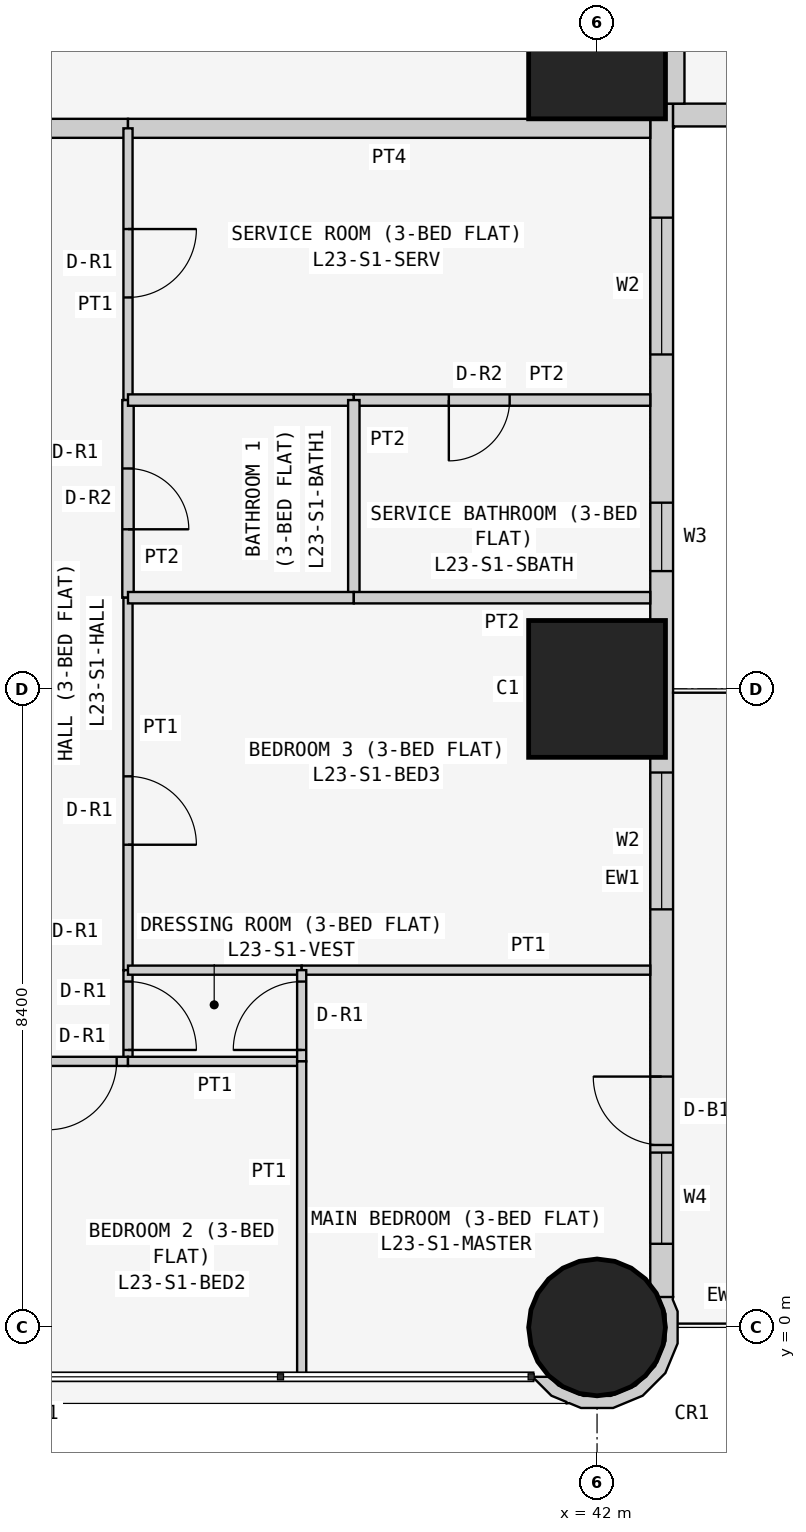
"""IFC4 building model, lengths in metres.
Left out: names, types, materials, properties, quantities, classifications, styles, units other than length and angle.
Written with IfcOpenShell. Run it as: python <this file> out.ifc"""

import sys

from ifc_helpers import new_model, si_unit, direction, frame, frame_2d, origin, origin_2d, place, context, subcontext, project, spatial, polyline, rectangle, circle, outline, extrude, element, fill, save


model = new_model("IFC4")
c1 = context("Model", 3, precision=1e-05, world=origin(), true_north=direction((0.0, 1.0)))
c2 = subcontext(c1, "Body", "Model", "MODEL_VIEW")
j1 = project(units=[si_unit("LENGTHUNIT", "METRE"), si_unit("PLANEANGLEUNIT", "RADIAN")], contexts=[c1])
p1 = place(None, origin())
s1 = spatial("IfcSite", under=j1, at=p1, CompositionType="ELEMENT")
p2 = place(p1, origin())
s2 = spatial("IfcBuilding", under=s1, at=p2, CompositionType="ELEMENT")
p3 = place(p2, frame((0.0, 0.0, 92.1)))
s3 = spatial("IfcBuildingStorey", under=s2, at=p3, CompositionType="ELEMENT", Elevation=92.1)
p4 = place(p3, frame((42.0, 0.0, 0.0), z_axis=(0.0, 0.0, 1.0), x_axis=(1.0, 0.0, 0.0)))
e1 = element("IfcColumn", 1, at=p4, inside=s3, PredefinedType="COLUMN", context=c2, shape_type="SweptSolid", body=[
    extrude(circle(Radius=0.9, at=origin_2d()), origin(), (0.0, 0.0, 1.0), 3.6),
])
for number, where, z_axis, x_axis in (
    (2, (42.0, 8.4, 0.0), (0.0, 0.0, 1.0), (1.0, 0.0, 0.0)),
    (3, (42.0, 16.8, 0.0), (0.0, 0.0, 1.0), (1.0, 0.0, 0.0)),
):
    element("IfcColumn", number, at=place(p3, frame(where, z_axis=z_axis, x_axis=x_axis)), inside=s3, PredefinedType="COLUMN", context=c2, shape_type="SweptSolid", body=[
        extrude(rectangle(XDim=1.8, YDim=1.8, at=origin_2d()), origin(), (0.0, 0.0, 1.0), 3.6),
    ])
p5 = place(p3, frame((42.85, 0.4, 0.0), z_axis=(0.0, 0.0, 1.0), x_axis=(0.0, 1.0, 0.0)))
e4 = element("IfcWall", 4, at=p5, inside=s3, PredefinedType="SOLIDWALL", context=c2, shape_type="SweptSolid", body=[
    extrude(rectangle(XDim=15.7, YDim=0.3, at=frame_2d((7.85, 0.0))), origin(), (0.0, 0.0, 1.0), 3.45),
])
p6 = place(p5, frame((12.4, 0.0, 0.9)))
e5 = element("IfcOpeningElement", 5, at=p6, cuts=e4, PredefinedType="OPENING", context=c2, shape_type="SweptSolid", body=[
    extrude(rectangle(XDim=1.8, YDim=1.5, at=frame_2d((0.9, 0.75))), frame((0.0, 0.16, 0.0), z_axis=(0.0, -1.0, 0.0), x_axis=(1.0, 0.0, 0.0)), (0.0, 0.0, 1.0), 0.32),
])
p7 = place(p5, frame((9.55, 0.0, 1.5)))
e6 = element("IfcOpeningElement", 6, at=p7, cuts=e4, PredefinedType="OPENING", context=c2, shape_type="SweptSolid", body=[
    extrude(rectangle(XDim=0.9, YDim=0.7, at=frame_2d((0.45, 0.35))), frame((0.0, 0.16, 0.0), z_axis=(0.0, -1.0, 0.0), x_axis=(1.0, 0.0, 0.0)), (0.0, 0.0, 1.0), 0.32),
])
p8 = place(p5, frame((5.1, 0.0, 0.9)))
e7 = element("IfcOpeningElement", 7, at=p8, cuts=e4, PredefinedType="OPENING", context=c2, shape_type="SweptSolid", body=[
    extrude(rectangle(XDim=1.8, YDim=1.5, at=frame_2d((0.9, 0.75))), frame((0.0, 0.16, 0.0), z_axis=(0.0, -1.0, 0.0), x_axis=(1.0, 0.0, 0.0)), (0.0, 0.0, 1.0), 0.32),
])
p9 = place(p5, frame((2.0, 0.0, 0.0)))
e8 = element("IfcOpeningElement", 8, at=p9, cuts=e4, PredefinedType="OPENING", context=c2, shape_type="SweptSolid", body=[
    extrude(rectangle(XDim=0.9, YDim=2.4, at=frame_2d((0.45, 1.2))), frame((0.0, 0.16, 0.0), z_axis=(0.0, -1.0, 0.0), x_axis=(1.0, 0.0, 0.0)), (0.0, 0.0, 1.0), 0.32),
])
p10 = place(p5, frame((0.7, 0.0, 0.9)))
e9 = element("IfcOpeningElement", 9, at=p10, cuts=e4, PredefinedType="OPENING", context=c2, shape_type="SweptSolid", body=[
    extrude(rectangle(XDim=1.2, YDim=1.5, at=frame_2d((0.6, 0.75))), frame((0.0, 0.16, 0.0), z_axis=(0.0, -1.0, 0.0), x_axis=(1.0, 0.0, 0.0)), (0.0, 0.0, 1.0), 0.32),
])
p11 = place(p3, frame((43.0, 15.95, 0.0), z_axis=(0.0, 0.0, 1.0), x_axis=(1.0, 0.0, 0.0)))
e10 = element("IfcWall", 10, at=p11, inside=s3, PredefinedType="SOLIDWALL", context=c2, shape_type="SweptSolid", body=[
    extrude(rectangle(XDim=15.4, YDim=0.3, at=frame_2d((7.7, 0.0))), origin(), (0.0, 0.0, 1.0), 3.45),
])
p12 = place(p11, frame((1.2, 0.0, 0.9)))
e11 = element("IfcOpeningElement", 11, at=p12, cuts=e10, PredefinedType="OPENING", context=c2, shape_type="SweptSolid", body=[
    extrude(rectangle(XDim=1.8, YDim=1.5, at=frame_2d((0.9, 0.75))), frame((0.0, 0.16, 0.0), z_axis=(0.0, -1.0, 0.0), x_axis=(1.0, 0.0, 0.0)), (0.0, 0.0, 1.0), 0.32),
])
p13 = place(p11, frame((4.95, 0.0, 1.5)))
e12 = element("IfcOpeningElement", 12, at=p13, cuts=e10, PredefinedType="OPENING", context=c2, shape_type="SweptSolid", body=[
    extrude(rectangle(XDim=0.9, YDim=0.7, at=frame_2d((0.45, 0.35))), frame((0.0, 0.16, 0.0), z_axis=(0.0, -1.0, 0.0), x_axis=(1.0, 0.0, 0.0)), (0.0, 0.0, 1.0), 0.32),
])
p14 = place(p11, frame((8.5, 0.0, 0.9)))
e13 = element("IfcOpeningElement", 13, at=p14, cuts=e10, PredefinedType="OPENING", context=c2, shape_type="SweptSolid", body=[
    extrude(rectangle(XDim=1.8, YDim=1.5, at=frame_2d((0.9, 0.75))), frame((0.0, 0.16, 0.0), z_axis=(0.0, -1.0, 0.0), x_axis=(1.0, 0.0, 0.0)), (0.0, 0.0, 1.0), 0.32),
])
p15 = place(p11, frame((12.5, 0.0, 0.0)))
e14 = element("IfcOpeningElement", 14, at=p15, cuts=e10, PredefinedType="OPENING", context=c2, shape_type="SweptSolid", body=[
    extrude(rectangle(XDim=0.9, YDim=2.4, at=frame_2d((0.45, 1.2))), frame((0.0, 0.16, 0.0), z_axis=(0.0, -1.0, 0.0), x_axis=(1.0, 0.0, 0.0)), (0.0, 0.0, 1.0), 0.32),
])
p16 = place(p11, frame((13.5, 0.0, 0.9)))
e15 = element("IfcOpeningElement", 15, at=p16, cuts=e10, PredefinedType="OPENING", context=c2, shape_type="SweptSolid", body=[
    extrude(rectangle(XDim=1.2, YDim=1.5, at=frame_2d((0.6, 0.75))), frame((0.0, 0.16, 0.0), z_axis=(0.0, -1.0, 0.0), x_axis=(1.0, 0.0, 0.0)), (0.0, 0.0, 1.0), 0.32),
])
p17 = place(p3, frame((41.233, -0.611, 0.0), z_axis=(0.0, 0.0, 1.0), x_axis=(0.377204953059, -0.926129809145, 0.0)))
e16 = element("IfcWall", 16, at=p17, inside=s3, PredefinedType="SOLIDWALL", context=c2, shape_type="SweptSolid", body=[
    extrude(outline(polyline([(0.319, 1.843), (-0.072, 2.001), (-0.24, 2.001), (-0.269, 2.017), (-0.37, 1.841), (-0.102, 1.842), (0.23, 1.707), (0.485, 1.455), (0.624, 1.125), (0.626, 0.766), (0.49, 0.434), (0.239, 0.179), (0.09, 0.117), (0.011, -0.078), (0.024, -0.083), (0.33, 0.045), (0.48, 0.197), (0.499, 0.193), (0.508, 0.225), (0.626, 0.345), (0.785, 0.736), (0.782, 1.157), (0.619, 1.546), (0.319, 1.843)])), origin(), (0.0, 0.0, 1.0), 3.45),
])
p18 = place(p3, frame((43.025, 22.571, 0.0), z_axis=(0.0, 0.0, 1.0), x_axis=(0.0, -1.0, 0.0)))
e17 = element("IfcWall", 17, at=p18, inside=s3, PredefinedType="PARTITIONING", context=c2, shape_type="SweptSolid", body=[
    extrude(rectangle(XDim=6.471, YDim=0.25, at=frame_2d((3.235, 0.0))), origin(), (0.0, 0.0, 1.0), 3.45),
])
p19 = place(p3, frame((35.829, 15.775, 0.0), z_axis=(0.0, 0.0, 1.0), x_axis=(-1.0, 0.0, 0.0)))
e18 = element("IfcWall", 18, at=p19, inside=s3, PredefinedType="PARTITIONING", context=c2, shape_type="SweptSolid", body=[
    extrude(rectangle(XDim=1.2, YDim=0.25, at=frame_2d((0.6, 0.0))), origin(), (0.0, 0.0, 1.0), 3.45),
])
p20 = place(p3, frame((42.7, 15.775, 0.0), z_axis=(0.0, 0.0, 1.0), x_axis=(-1.0, 0.0, 0.0)))
e19 = element("IfcWall", 19, at=p20, inside=s3, PredefinedType="PARTITIONING", context=c2, shape_type="SweptSolid", body=[
    extrude(rectangle(XDim=6.871, YDim=0.25, at=frame_2d((3.436, 0.0))), origin(), (0.0, 0.0, 1.0), 3.45),
])
p21 = place(p3, frame((35.829, 12.2, 0.0), z_axis=(0.0, 0.0, 1.0), x_axis=(0.0, 1.0, 0.0)))
e20 = element("IfcWall", 20, at=p21, inside=s3, PredefinedType="PARTITIONING", context=c2, shape_type="SweptSolid", body=[
    extrude(rectangle(XDim=3.575, YDim=0.12, at=frame_2d((1.788, 0.0))), origin(), (0.0, 0.0, 1.0), 3.45),
])
p22 = place(p21, frame((1.35, 0.0, 0.0)))
e21 = element("IfcOpeningElement", 21, at=p22, cuts=e20, PredefinedType="OPENING", context=c2, shape_type="SweptSolid", body=[
    extrude(rectangle(XDim=0.9, YDim=2.1, at=frame_2d((0.45, 1.05))), frame((0.0, 0.07, 0.0), z_axis=(0.0, -1.0, 0.0), x_axis=(1.0, 0.0, 0.0)), (0.0, 0.0, 1.0), 0.14),
])
p23 = place(p3, frame((35.829, 9.6, 0.0), z_axis=(0.0, 0.0, 1.0), x_axis=(0.0, 1.0, 0.0)))
e22 = element("IfcWall", 22, at=p23, inside=s3, PredefinedType="PARTITIONING", context=c2, shape_type="SweptSolid", body=[
    extrude(rectangle(XDim=2.6, YDim=0.15, at=frame_2d((1.3, 0.0))), origin(), (0.0, 0.0, 1.0), 3.45),
])
p24 = place(p23, frame((0.9, 0.0, 0.0)))
e23 = element("IfcOpeningElement", 23, at=p24, cuts=e22, PredefinedType="OPENING", context=c2, shape_type="SweptSolid", body=[
    extrude(rectangle(XDim=0.8, YDim=2.1, at=frame_2d((0.4, 1.05))), frame((0.0, 0.085, 0.0), z_axis=(0.0, -1.0, 0.0), x_axis=(1.0, 0.0, 0.0)), (0.0, 0.0, 1.0), 0.17),
])
p25 = place(p3, frame((35.829, 4.7, 0.0), z_axis=(0.0, 0.0, 1.0), x_axis=(0.0, 1.0, 0.0)))
e24 = element("IfcWall", 24, at=p25, inside=s3, PredefinedType="PARTITIONING", context=c2, shape_type="SweptSolid", body=[
    extrude(rectangle(XDim=4.9, YDim=0.12, at=frame_2d((2.45, 0.0))), origin(), (0.0, 0.0, 1.0), 3.45),
])
p26 = place(p25, frame((1.65, 0.0, 0.0)))
e25 = element("IfcOpeningElement", 25, at=p26, cuts=e24, PredefinedType="OPENING", context=c2, shape_type="SweptSolid", body=[
    extrude(rectangle(XDim=0.9, YDim=2.1, at=frame_2d((0.45, 1.05))), frame((0.0, 0.07, 0.0), z_axis=(0.0, -1.0, 0.0), x_axis=(1.0, 0.0, 0.0)), (0.0, 0.0, 1.0), 0.14),
])
p27 = place(p3, frame((35.829, 3.5, 0.0), z_axis=(0.0, 0.0, 1.0), x_axis=(0.0, 1.0, 0.0)))
e26 = element("IfcWall", 26, at=p27, inside=s3, PredefinedType="PARTITIONING", context=c2, shape_type="SweptSolid", body=[
    extrude(rectangle(XDim=1.2, YDim=0.12, at=frame_2d((0.6, 0.0))), origin(), (0.0, 0.0, 1.0), 3.45),
])
p28 = place(p27, frame((0.15, 0.0, 0.0)))
e27 = element("IfcOpeningElement", 27, at=p28, cuts=e26, PredefinedType="OPENING", context=c2, shape_type="SweptSolid", body=[
    extrude(rectangle(XDim=0.9, YDim=2.1, at=frame_2d((0.45, 1.05))), frame((0.0, 0.07, 0.0), z_axis=(0.0, -1.0, 0.0), x_axis=(1.0, 0.0, 0.0)), (0.0, 0.0, 1.0), 0.14),
])
p29 = place(p3, frame((34.629, 3.5, 0.0), z_axis=(0.0, 0.0, 1.0), x_axis=(1.0, 0.0, 0.0)))
e28 = element("IfcWall", 28, at=p29, inside=s3, PredefinedType="PARTITIONING", context=c2, shape_type="SweptSolid", body=[
    extrude(rectangle(XDim=1.2, YDim=0.12, at=frame_2d((0.6, 0.0))), origin(), (0.0, 0.0, 1.0), 3.45),
])
p30 = place(p29, frame((0.151, 0.0, 0.0)))
e29 = element("IfcOpeningElement", 29, at=p30, cuts=e28, PredefinedType="OPENING", context=c2, shape_type="SweptSolid", body=[
    extrude(rectangle(XDim=0.9, YDim=2.1, at=frame_2d((0.45, 1.05))), frame((0.0, 0.07, 0.0), z_axis=(0.0, -1.0, 0.0), x_axis=(1.0, 0.0, 0.0)), (0.0, 0.0, 1.0), 0.14),
])
p31 = place(p3, frame((35.829, 12.2, 0.0), z_axis=(0.0, 0.0, 1.0), x_axis=(1.0, 0.0, 0.0)))
e30 = element("IfcWall", 30, at=p31, inside=s3, PredefinedType="PARTITIONING", context=c2, shape_type="SweptSolid", body=[
    extrude(rectangle(XDim=2.971, YDim=0.15, at=frame_2d((1.485, 0.0))), origin(), (0.0, 0.0, 1.0), 3.45),
])
p32 = place(p3, frame((38.8, 12.2, 0.0), z_axis=(0.0, 0.0, 1.0), x_axis=(1.0, 0.0, 0.0)))
e31 = element("IfcWall", 31, at=p32, inside=s3, PredefinedType="PARTITIONING", context=c2, shape_type="SweptSolid", body=[
    extrude(rectangle(XDim=3.9, YDim=0.15, at=frame_2d((1.95, 0.0))), origin(), (0.0, 0.0, 1.0), 3.45),
])
p33 = place(p32, frame((1.25, 0.0, 0.0)))
e32 = element("IfcOpeningElement", 32, at=p33, cuts=e31, PredefinedType="OPENING", context=c2, shape_type="SweptSolid", body=[
    extrude(rectangle(XDim=0.8, YDim=2.1, at=frame_2d((0.4, 1.05))), frame((0.0, 0.085, 0.0), z_axis=(0.0, -1.0, 0.0), x_axis=(1.0, 0.0, 0.0)), (0.0, 0.0, 1.0), 0.17),
])
p34 = place(p3, frame((38.8, 9.6, 0.0), z_axis=(0.0, 0.0, 1.0), x_axis=(0.0, 1.0, 0.0)))
e33 = element("IfcWall", 33, at=p34, inside=s3, PredefinedType="PARTITIONING", context=c2, shape_type="SweptSolid", body=[
    extrude(rectangle(XDim=2.6, YDim=0.15, at=frame_2d((1.3, 0.0))), origin(), (0.0, 0.0, 1.0), 3.45),
])
p35 = place(p3, frame((35.829, 9.6, 0.0), z_axis=(0.0, 0.0, 1.0), x_axis=(1.0, 0.0, 0.0)))
e34 = element("IfcWall", 34, at=p35, inside=s3, PredefinedType="PARTITIONING", context=c2, shape_type="SweptSolid", body=[
    extrude(rectangle(XDim=2.971, YDim=0.15, at=frame_2d((1.485, 0.0))), origin(), (0.0, 0.0, 1.0), 3.45),
])
p36 = place(p3, frame((38.8, 9.6, 0.0), z_axis=(0.0, 0.0, 1.0), x_axis=(1.0, 0.0, 0.0)))
e35 = element("IfcWall", 35, at=p36, inside=s3, PredefinedType="PARTITIONING", context=c2, shape_type="SweptSolid", body=[
    extrude(rectangle(XDim=3.9, YDim=0.15, at=frame_2d((1.95, 0.0))), origin(), (0.0, 0.0, 1.0), 3.45),
])
p37 = place(p3, frame((35.829, 4.7, 0.0), z_axis=(0.0, 0.0, 1.0), x_axis=(1.0, 0.0, 0.0)))
e36 = element("IfcWall", 36, at=p37, inside=s3, PredefinedType="PARTITIONING", context=c2, shape_type="SweptSolid", body=[
    extrude(rectangle(XDim=2.285, YDim=0.12, at=frame_2d((1.143, 0.0))), origin(), (0.0, 0.0, 1.0), 3.45),
])
p38 = place(p3, frame((38.114, 4.7, 0.0), z_axis=(0.0, 0.0, 1.0), x_axis=(1.0, 0.0, 0.0)))
e37 = element("IfcWall", 37, at=p38, inside=s3, PredefinedType="PARTITIONING", context=c2, shape_type="SweptSolid", body=[
    extrude(rectangle(XDim=4.586, YDim=0.12, at=frame_2d((2.293, 0.0))), origin(), (0.0, 0.0, 1.0), 3.45),
])
p39 = place(p3, frame((35.829, 3.5, 0.0), z_axis=(0.0, 0.0, 1.0), x_axis=(1.0, 0.0, 0.0)))
e38 = element("IfcWall", 38, at=p39, inside=s3, PredefinedType="PARTITIONING", context=c2, shape_type="SweptSolid", body=[
    extrude(rectangle(XDim=2.285, YDim=0.12, at=frame_2d((1.143, 0.0))), origin(), (0.0, 0.0, 1.0), 3.45),
])
p40 = place(p3, frame((38.114, 3.5, 0.0), z_axis=(0.0, 0.0, 1.0), x_axis=(0.0, 1.0, 0.0)))
e39 = element("IfcWall", 39, at=p40, inside=s3, PredefinedType="PARTITIONING", context=c2, shape_type="SweptSolid", body=[
    extrude(rectangle(XDim=1.2, YDim=0.12, at=frame_2d((0.6, 0.0))), origin(), (0.0, 0.0, 1.0), 3.45),
])
p41 = place(p40, frame((0.15, 0.0, 0.0)))
e40 = element("IfcOpeningElement", 40, at=p41, cuts=e39, PredefinedType="OPENING", context=c2, shape_type="SweptSolid", body=[
    extrude(rectangle(XDim=0.9, YDim=2.1, at=frame_2d((0.45, 1.05))), frame((0.0, 0.07, 0.0), z_axis=(0.0, -1.0, 0.0), x_axis=(1.0, 0.0, 0.0)), (0.0, 0.0, 1.0), 0.14),
])
p42 = place(p3, frame((38.114, -0.65, 0.0), z_axis=(0.0, 0.0, 1.0), x_axis=(0.0, 1.0, 0.0)))
e41 = element("IfcWall", 41, at=p42, inside=s3, PredefinedType="PARTITIONING", context=c2, shape_type="SweptSolid", body=[
    extrude(rectangle(XDim=4.15, YDim=0.12, at=frame_2d((2.075, 0.0))), origin(), (0.0, 0.0, 1.0), 3.45),
])
p43 = place(p6, origin())
e42 = element("IfcWindow", 42, at=p43, inside=s3, PartitioningType="SINGLE_PANEL", PredefinedType="WINDOW", context=c2, shape_type="SweptSolid", body=[
    extrude(rectangle(XDim=1.8, YDim=1.5, at=frame_2d((0.9, 0.75))), frame((0.0, 0.03, 0.0), z_axis=(0.0, -1.0, 0.0), x_axis=(1.0, 0.0, 0.0)), (0.0, 0.0, 1.0), 0.06),
])
fill(e5, e42)
p44 = place(p7, origin())
e43 = element("IfcWindow", 43, at=p44, inside=s3, PartitioningType="SINGLE_PANEL", PredefinedType="WINDOW", context=c2, shape_type="SweptSolid", body=[
    extrude(rectangle(XDim=0.9, YDim=0.7, at=frame_2d((0.45, 0.35))), frame((0.0, 0.03, 0.0), z_axis=(0.0, -1.0, 0.0), x_axis=(1.0, 0.0, 0.0)), (0.0, 0.0, 1.0), 0.06),
])
fill(e6, e43)
p45 = place(p8, origin())
e44 = element("IfcWindow", 44, at=p45, inside=s3, PartitioningType="SINGLE_PANEL", PredefinedType="WINDOW", context=c2, shape_type="SweptSolid", body=[
    extrude(rectangle(XDim=1.8, YDim=1.5, at=frame_2d((0.9, 0.75))), frame((0.0, 0.03, 0.0), z_axis=(0.0, -1.0, 0.0), x_axis=(1.0, 0.0, 0.0)), (0.0, 0.0, 1.0), 0.06),
])
fill(e7, e44)
p46 = place(p9, origin())
e45 = element("IfcDoor", 45, at=p46, inside=s3, OperationType="SINGLE_SWING_RIGHT", PredefinedType="DOOR", context=c2, shape_type="SweptSolid", body=[
    extrude(rectangle(XDim=0.9, YDim=2.4, at=frame_2d((0.45, 1.2))), frame((0.0, 0.025, 0.0), z_axis=(0.0, -1.0, 0.0), x_axis=(1.0, 0.0, 0.0)), (0.0, 0.0, 1.0), 0.05),
])
fill(e8, e45)
p47 = place(p10, origin())
e46 = element("IfcWindow", 46, at=p47, inside=s3, PartitioningType="SINGLE_PANEL", PredefinedType="WINDOW", context=c2, shape_type="SweptSolid", body=[
    extrude(rectangle(XDim=1.2, YDim=1.5, at=frame_2d((0.6, 0.75))), frame((0.0, 0.03, 0.0), z_axis=(0.0, -1.0, 0.0), x_axis=(1.0, 0.0, 0.0)), (0.0, 0.0, 1.0), 0.06),
])
fill(e9, e46)
p48 = place(p22, frame((0.9, 0.0, 0.0), z_axis=(0.0, 0.0, 1.0), x_axis=(-1.0, 0.0, 0.0)))
e47 = element("IfcDoor", 47, at=p48, inside=s3, OperationType="SINGLE_SWING_LEFT", PredefinedType="DOOR", context=c2, shape_type="SweptSolid", body=[
    extrude(rectangle(XDim=0.9, YDim=2.1, at=frame_2d((0.45, 1.05))), frame((0.0, 0.025, 0.0), z_axis=(0.0, -1.0, 0.0), x_axis=(1.0, 0.0, 0.0)), (0.0, 0.0, 1.0), 0.05),
])
fill(e21, e47)
p49 = place(p33, frame((0.8, 0.0, 0.0), z_axis=(0.0, 0.0, 1.0), x_axis=(-1.0, 0.0, 0.0)))
e48 = element("IfcDoor", 48, at=p49, inside=s3, OperationType="SINGLE_SWING_RIGHT", PredefinedType="DOOR", context=c2, shape_type="SweptSolid", body=[
    extrude(rectangle(XDim=0.8, YDim=2.1, at=frame_2d((0.4, 1.05))), frame((0.0, 0.025, 0.0), z_axis=(0.0, -1.0, 0.0), x_axis=(1.0, 0.0, 0.0)), (0.0, 0.0, 1.0), 0.05),
])
fill(e32, e48)
p50 = place(p24, frame((0.8, 0.0, 0.0), z_axis=(0.0, 0.0, 1.0), x_axis=(-1.0, 0.0, 0.0)))
e49 = element("IfcDoor", 49, at=p50, inside=s3, OperationType="SINGLE_SWING_RIGHT", PredefinedType="DOOR", context=c2, shape_type="SweptSolid", body=[
    extrude(rectangle(XDim=0.8, YDim=2.1, at=frame_2d((0.4, 1.05))), frame((0.0, 0.025, 0.0), z_axis=(0.0, -1.0, 0.0), x_axis=(1.0, 0.0, 0.0)), (0.0, 0.0, 1.0), 0.05),
])
fill(e23, e49)
p51 = place(p26, frame((0.9, 0.0, 0.0), z_axis=(0.0, 0.0, 1.0), x_axis=(-1.0, 0.0, 0.0)))
e50 = element("IfcDoor", 50, at=p51, inside=s3, OperationType="SINGLE_SWING_RIGHT", PredefinedType="DOOR", context=c2, shape_type="SweptSolid", body=[
    extrude(rectangle(XDim=0.9, YDim=2.1, at=frame_2d((0.45, 1.05))), frame((0.0, 0.025, 0.0), z_axis=(0.0, -1.0, 0.0), x_axis=(1.0, 0.0, 0.0)), (0.0, 0.0, 1.0), 0.05),
])
fill(e25, e50)
p52 = place(p28, frame((0.9, 0.0, 0.0), z_axis=(0.0, 0.0, 1.0), x_axis=(-1.0, 0.0, 0.0)))
e51 = element("IfcDoor", 51, at=p52, inside=s3, OperationType="SINGLE_SWING_RIGHT", PredefinedType="DOOR", context=c2, shape_type="SweptSolid", body=[
    extrude(rectangle(XDim=0.9, YDim=2.1, at=frame_2d((0.45, 1.05))), frame((0.0, 0.025, 0.0), z_axis=(0.0, -1.0, 0.0), x_axis=(1.0, 0.0, 0.0)), (0.0, 0.0, 1.0), 0.05),
])
fill(e27, e51)
p53 = place(p41, origin())
e52 = element("IfcDoor", 52, at=p53, inside=s3, OperationType="SINGLE_SWING_LEFT", PredefinedType="DOOR", context=c2, shape_type="SweptSolid", body=[
    extrude(rectangle(XDim=0.9, YDim=2.1, at=frame_2d((0.45, 1.05))), frame((0.0, 0.025, 0.0), z_axis=(0.0, -1.0, 0.0), x_axis=(1.0, 0.0, 0.0)), (0.0, 0.0, 1.0), 0.05),
])
fill(e40, e52)
p54 = place(p30, frame((0.9, 0.0, 0.0), z_axis=(0.0, 0.0, 1.0), x_axis=(-1.0, 0.0, 0.0)))
e53 = element("IfcDoor", 53, at=p54, inside=s3, OperationType="SINGLE_SWING_RIGHT", PredefinedType="DOOR", context=c2, shape_type="SweptSolid", body=[
    extrude(rectangle(XDim=0.9, YDim=2.1, at=frame_2d((0.45, 1.05))), frame((0.0, 0.025, 0.0), z_axis=(0.0, -1.0, 0.0), x_axis=(1.0, 0.0, 0.0)), (0.0, 0.0, 1.0), 0.05),
])
fill(e29, e53)
save(model, sys.argv[1])
